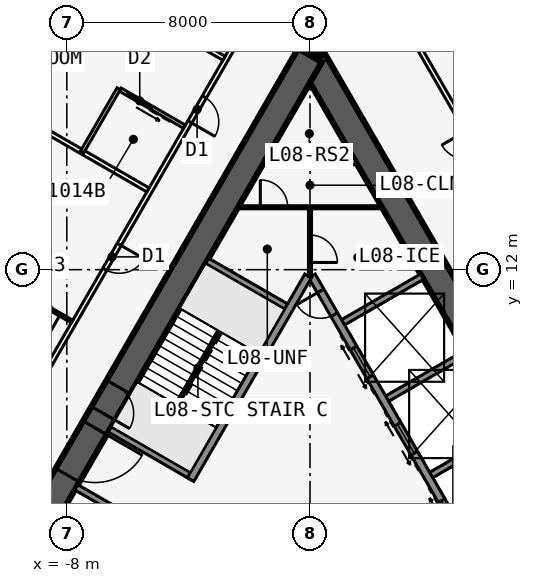
"""IFC4 building model, lengths in metres.
Left out: names, types, materials, properties, quantities, classifications, styles, units other than length and angle.
Written with IfcOpenShell. Run it as: python <this file> out.ifc"""

import sys

from ifc_helpers import new_model, si_unit, direction, frame, frame_2d, origin, place, context, subcontext, project, spatial, rectangle, extrude, element, fill, save


model = new_model("IFC4")
c1 = context("Model", 3, precision=1e-05, world=origin(), true_north=direction((0.0, 1.0)))
c2 = subcontext(c1, "Body", "Model", "MODEL_VIEW")
j1 = project(units=[si_unit("LENGTHUNIT", "METRE"), si_unit("PLANEANGLEUNIT", "RADIAN")], contexts=[c1])
p1 = place(None, origin())
s1 = spatial("IfcSite", under=j1, at=p1, CompositionType="ELEMENT")
p2 = place(p1, origin())
s2 = spatial("IfcBuilding", under=s1, at=p2, CompositionType="ELEMENT")
p3 = place(p2, frame((0.0, 0.0, 38.7)))
s3 = spatial("IfcBuildingStorey", under=s2, at=p3, CompositionType="ELEMENT", Elevation=38.7)
p4 = place(p3, frame((16.5, -9.526, 0.0), z_axis=(0.0, 0.0, 1.0), x_axis=(-0.499999749417, 0.866025548458, 0.0)))
e1 = element("IfcWall", 1, at=p4, inside=s3, PredefinedType="SHEAR", context=c2, shape_type="SweptSolid", body=[
    extrude(rectangle(XDim=33.0, YDim=0.9, at=frame_2d((16.5, 0.0))), origin(), (0.0, 0.0, 1.0), 3.4),
])
p5 = place(p4, frame((14.15, 0.0, 0.0)))
e2 = element("IfcOpeningElement", 2, at=p5, cuts=e1, PredefinedType="OPENING", context=c2, shape_type="SweptSolid", body=[
    extrude(rectangle(XDim=1.8, YDim=2.13, at=frame_2d((0.9, 1.065))), frame((0.0, 0.46, 0.0), z_axis=(0.0, -1.0, 0.0), x_axis=(1.0, 0.0, 0.0)), (0.0, 0.0, 1.0), 0.92),
])
p6 = place(p4, frame((12.6, 0.0, 0.0)))
e3 = element("IfcOpeningElement", 3, at=p6, cuts=e1, PredefinedType="OPENING", context=c2, shape_type="SweptSolid", body=[
    extrude(rectangle(XDim=1.0, YDim=2.13, at=frame_2d((0.5, 1.065))), frame((0.0, 0.46, 0.0), z_axis=(0.0, -1.0, 0.0), x_axis=(1.0, 0.0, 0.0)), (0.0, 0.0, 1.0), 0.92),
])
p7 = place(p3, frame((5.379, 2.586, 0.0), z_axis=(0.0, 0.0, 1.0), x_axis=(-0.500001375892, 0.866024609411, 0.0)))
e4 = element("IfcWall", 4, at=p7, inside=s3, PredefinedType="SOLIDWALL", context=c2, shape_type="SweptSolid", body=[
    extrude(rectangle(XDim=10.633, YDim=0.25, at=frame_2d((5.316, 0.0))), origin(), (0.0, 0.0, 1.0), 3.235),
])
p8 = place(p7, frame((9.164, 0.0, 0.0)))
e5 = element("IfcOpeningElement", 5, at=p8, cuts=e4, PredefinedType="OPENING", context=c2, shape_type="SweptSolid", body=[
    extrude(rectangle(XDim=0.9, YDim=2.13, at=frame_2d((0.45, 1.065))), frame((0.0, 0.135, 0.0), z_axis=(0.0, -1.0, 0.0), x_axis=(1.0, 0.0, 0.0)), (0.0, 0.0, 1.0), 0.27),
])
p9 = place(p7, frame((1.0, 0.0, 0.0)))
e6 = element("IfcOpeningElement", 6, at=p9, cuts=e4, PredefinedType="OPENING", context=c2, shape_type="SweptSolid", body=[
    extrude(rectangle(XDim=1.1, YDim=2.13, at=frame_2d((0.55, 1.065))), frame((0.0, 0.135, 0.0), z_axis=(0.0, -1.0, 0.0), x_axis=(1.0, 0.0, 0.0)), (0.0, 0.0, 1.0), 0.27),
])
p10 = place(p7, frame((3.9, 0.0, 0.0)))
e7 = element("IfcOpeningElement", 7, at=p10, cuts=e4, PredefinedType="OPENING", context=c2, shape_type="SweptSolid", body=[
    extrude(rectangle(XDim=1.1, YDim=2.13, at=frame_2d((0.55, 1.065))), frame((0.0, 0.135, 0.0), z_axis=(0.0, -1.0, 0.0), x_axis=(1.0, 0.0, 0.0)), (0.0, 0.0, 1.0), 0.27),
])
p11 = place(p7, frame((6.8, 0.0, 0.0)))
e8 = element("IfcOpeningElement", 8, at=p11, cuts=e4, PredefinedType="OPENING", context=c2, shape_type="SweptSolid", body=[
    extrude(rectangle(XDim=1.1, YDim=2.13, at=frame_2d((0.55, 1.065))), frame((0.0, 0.135, 0.0), z_axis=(0.0, -1.0, 0.0), x_axis=(1.0, 0.0, 0.0)), (0.0, 0.0, 1.0), 0.27),
])
for number, where, z_axis, x_axis in (
    (9, (3.879, 5.184, 0.0), (0.0, 0.0, 1.0), (0.866, 0.5, 0.0)),
    (10, (2.429, 7.696, 0.0), (0.0, 0.0, 1.0), (0.866, 0.5, 0.0)),
    (11, (0.979, 10.207, 0.0), (0.0, 0.0, 1.0), (0.866, 0.5, 0.0)),
):
    element("IfcWall", number, at=place(p3, frame(where, z_axis=z_axis, x_axis=x_axis)), inside=s3, PredefinedType="SOLIDWALL", context=c2, shape_type="SweptSolid", body=[
        extrude(rectangle(XDim=3.125, YDim=0.2, at=frame_2d((1.562, 0.0))), origin(), (0.0, 0.0, 1.0), 3.235),
    ])
p12 = place(p3, frame((0.0, 19.052, 0.0), z_axis=(0.0, 0.0, 1.0), x_axis=(-0.499999749417, -0.866025548458, 0.0)))
e12 = element("IfcWall", 12, at=p12, inside=s3, PredefinedType="SHEAR", context=c2, shape_type="SweptSolid", body=[
    extrude(rectangle(XDim=33.0, YDim=0.9, at=frame_2d((16.5, 0.0))), origin(), (0.0, 0.0, 1.0), 3.4),
])
p13 = place(p12, frame((14.15, 0.0, 0.0)))
e13 = element("IfcOpeningElement", 13, at=p13, cuts=e12, PredefinedType="OPENING", context=c2, shape_type="SweptSolid", body=[
    extrude(rectangle(XDim=1.8, YDim=2.13, at=frame_2d((0.9, 1.065))), frame((0.0, 0.46, 0.0), z_axis=(0.0, -1.0, 0.0), x_axis=(1.0, 0.0, 0.0)), (0.0, 0.0, 1.0), 0.92),
])
p14 = place(p12, frame((12.6, 0.0, 0.0)))
e14 = element("IfcOpeningElement", 14, at=p14, cuts=e12, PredefinedType="OPENING", context=c2, shape_type="SweptSolid", body=[
    extrude(rectangle(XDim=1.0, YDim=2.13, at=frame_2d((0.5, 1.065))), frame((0.0, 0.46, 0.0), z_axis=(0.0, -1.0, 0.0), x_axis=(1.0, 0.0, 0.0)), (0.0, 0.0, 1.0), 0.92),
])
p15 = place(p3, frame((-0.062, 11.794, 0.0), z_axis=(0.0, 0.0, 1.0), x_axis=(-0.500006680225, -0.86602154692, 0.0)))
e15 = element("IfcWall", 15, at=p15, inside=s3, PredefinedType="SOLIDWALL", context=c2, shape_type="SweptSolid", body=[
    extrude(rectangle(XDim=7.733, YDim=0.25, at=frame_2d((3.866, 0.0))), origin(), (0.0, 0.0, 1.0), 3.235),
])
for number, where, z_axis, x_axis in (
    (16, (-0.679, 10.727, 0.0), (0.0, 0.0, 1.0), (-0.866, 0.5, 0.0)),
    (17, (-3.879, 5.184, 0.0), (0.0, 0.0, 1.0), (-0.866, 0.5, 0.0)),
    (18, (-4.979, 3.279, 0.0), (0.0, 0.0, 1.0), (-0.866, 0.5, 0.0)),
):
    element("IfcWall", number, at=place(p3, frame(where, z_axis=z_axis, x_axis=x_axis)), inside=s3, PredefinedType="SOLIDWALL", context=c2, shape_type="SweptSolid", body=[
        extrude(rectangle(XDim=3.125, YDim=0.2, at=frame_2d((1.562, 0.0))), origin(), (0.0, 0.0, 1.0), 3.235),
    ])
p16 = place(p3, frame((0.0, 19.052, 0.0), z_axis=(0.0, 0.0, 1.0), x_axis=(0.0, 1.0, 0.0)))
e19 = element("IfcWall", 19, at=p16, inside=s3, PredefinedType="SHEAR", context=c2, shape_type="SweptSolid", body=[
    extrude(rectangle(XDim=4.746, YDim=0.9, at=frame_2d((2.373, 0.0))), origin(), (0.0, 0.0, 1.0), 3.4),
])
p17 = place(p16, frame((1.8, 0.0, 0.0)))
e20 = element("IfcOpeningElement", 20, at=p17, cuts=e19, PredefinedType="OPENING", context=c2, shape_type="SweptSolid", body=[
    extrude(rectangle(XDim=1.8, YDim=2.13, at=frame_2d((0.9, 1.065))), frame((0.0, 0.46, 0.0), z_axis=(0.0, -1.0, 0.0), x_axis=(1.0, 0.0, 0.0)), (0.0, 0.0, 1.0), 0.92),
])
p18 = place(p3, frame((21.586, -11.885, 0.0), z_axis=(0.0, 0.0, 1.0), x_axis=(-0.500001915564, 0.86602429783, 0.0)))
e21 = element("IfcWall", 21, at=p18, inside=s3, PredefinedType="PARTITIONING", context=c2, shape_type="SweptSolid", body=[
    extrude(rectangle(XDim=42.172, YDim=0.15, at=frame_2d((21.086, 0.0))), origin(), (0.0, 0.0, 1.0), 3.235),
])
p19 = place(p18, frame((1.911, 0.0, 0.0)))
e22 = element("IfcOpeningElement", 22, at=p19, cuts=e21, PredefinedType="OPENING", context=c2, shape_type="SweptSolid", body=[
    extrude(rectangle(XDim=0.95, YDim=2.13, at=frame_2d((0.475, 1.065))), frame((0.0, 0.085, 0.0), z_axis=(0.0, -1.0, 0.0), x_axis=(1.0, 0.0, 0.0)), (0.0, 0.0, 1.0), 0.17),
])
p20 = place(p18, frame((7.511, 0.0, 0.0)))
e23 = element("IfcOpeningElement", 23, at=p20, cuts=e21, PredefinedType="OPENING", context=c2, shape_type="SweptSolid", body=[
    extrude(rectangle(XDim=0.95, YDim=2.13, at=frame_2d((0.475, 1.065))), frame((0.0, 0.085, 0.0), z_axis=(0.0, -1.0, 0.0), x_axis=(1.0, 0.0, 0.0)), (0.0, 0.0, 1.0), 0.17),
])
p21 = place(p18, frame((13.711, 0.0, 0.0)))
e24 = element("IfcOpeningElement", 24, at=p21, cuts=e21, PredefinedType="OPENING", context=c2, shape_type="SweptSolid", body=[
    extrude(rectangle(XDim=0.95, YDim=2.13, at=frame_2d((0.475, 1.065))), frame((0.0, 0.085, 0.0), z_axis=(0.0, -1.0, 0.0), x_axis=(1.0, 0.0, 0.0)), (0.0, 0.0, 1.0), 0.17),
])
p22 = place(p18, frame((21.911, 0.0, 0.0)))
e25 = element("IfcOpeningElement", 25, at=p22, cuts=e21, PredefinedType="OPENING", context=c2, shape_type="SweptSolid", body=[
    extrude(rectangle(XDim=0.95, YDim=2.13, at=frame_2d((0.475, 1.065))), frame((0.0, 0.085, 0.0), z_axis=(0.0, -1.0, 0.0), x_axis=(1.0, 0.0, 0.0)), (0.0, 0.0, 1.0), 0.17),
])
p23 = place(p18, frame((28.711, 0.0, 0.0)))
e26 = element("IfcOpeningElement", 26, at=p23, cuts=e21, PredefinedType="OPENING", context=c2, shape_type="SweptSolid", body=[
    extrude(rectangle(XDim=0.95, YDim=2.13, at=frame_2d((0.475, 1.065))), frame((0.0, 0.085, 0.0), z_axis=(0.0, -1.0, 0.0), x_axis=(1.0, 0.0, 0.0)), (0.0, 0.0, 1.0), 0.17),
])
p24 = place(p18, frame((31.911, 0.0, 0.0)))
e27 = element("IfcOpeningElement", 27, at=p24, cuts=e21, PredefinedType="OPENING", context=c2, shape_type="SweptSolid", body=[
    extrude(rectangle(XDim=0.95, YDim=2.13, at=frame_2d((0.475, 1.065))), frame((0.0, 0.085, 0.0), z_axis=(0.0, -1.0, 0.0), x_axis=(1.0, 0.0, 0.0)), (0.0, 0.0, 1.0), 0.17),
])
p25 = place(p18, frame((39.311, 0.0, 0.0)))
e28 = element("IfcOpeningElement", 28, at=p25, cuts=e21, PredefinedType="OPENING", context=c2, shape_type="SweptSolid", body=[
    extrude(rectangle(XDim=0.95, YDim=2.13, at=frame_2d((0.475, 1.065))), frame((0.0, 0.085, 0.0), z_axis=(0.0, -1.0, 0.0), x_axis=(1.0, 0.0, 0.0)), (0.0, 0.0, 1.0), 0.17),
])
p26 = place(p3, frame((-0.5, 22.836, 0.0), z_axis=(0.0, 0.0, 1.0), x_axis=(-0.500001677587, -0.866024435227, 0.0)))
e29 = element("IfcWall", 29, at=p26, inside=s3, PredefinedType="PARTITIONING", context=c2, shape_type="SweptSolid", body=[
    extrude(rectangle(XDim=39.054, YDim=0.15, at=frame_2d((19.527, 0.0))), origin(), (0.0, 0.0, 1.0), 3.235),
])
p27 = place(p26, frame((0.352, 0.0, 0.0)))
e30 = element("IfcOpeningElement", 30, at=p27, cuts=e29, PredefinedType="OPENING", context=c2, shape_type="SweptSolid", body=[
    extrude(rectangle(XDim=0.95, YDim=2.13, at=frame_2d((0.475, 1.065))), frame((0.0, 0.085, 0.0), z_axis=(0.0, -1.0, 0.0), x_axis=(1.0, 0.0, 0.0)), (0.0, 0.0, 1.0), 0.17),
])
p28 = place(p26, frame((5.952, 0.0, 0.0)))
e31 = element("IfcOpeningElement", 31, at=p28, cuts=e29, PredefinedType="OPENING", context=c2, shape_type="SweptSolid", body=[
    extrude(rectangle(XDim=0.95, YDim=2.13, at=frame_2d((0.475, 1.065))), frame((0.0, 0.085, 0.0), z_axis=(0.0, -1.0, 0.0), x_axis=(1.0, 0.0, 0.0)), (0.0, 0.0, 1.0), 0.17),
])
p29 = place(p26, frame((11.552, 0.0, 0.0)))
e32 = element("IfcOpeningElement", 32, at=p29, cuts=e29, PredefinedType="OPENING", context=c2, shape_type="SweptSolid", body=[
    extrude(rectangle(XDim=0.95, YDim=2.13, at=frame_2d((0.475, 1.065))), frame((0.0, 0.085, 0.0), z_axis=(0.0, -1.0, 0.0), x_axis=(1.0, 0.0, 0.0)), (0.0, 0.0, 1.0), 0.17),
])
p30 = place(p26, frame((21.552, 0.0, 0.0)))
e33 = element("IfcOpeningElement", 33, at=p30, cuts=e29, PredefinedType="OPENING", context=c2, shape_type="SweptSolid", body=[
    extrude(rectangle(XDim=0.95, YDim=2.13, at=frame_2d((0.475, 1.065))), frame((0.0, 0.085, 0.0), z_axis=(0.0, -1.0, 0.0), x_axis=(1.0, 0.0, 0.0)), (0.0, 0.0, 1.0), 0.17),
])
p31 = place(p26, frame((30.952, 0.0, 0.0)))
e34 = element("IfcOpeningElement", 34, at=p31, cuts=e29, PredefinedType="OPENING", context=c2, shape_type="SweptSolid", body=[
    extrude(rectangle(XDim=0.95, YDim=2.13, at=frame_2d((0.475, 1.065))), frame((0.0, 0.085, 0.0), z_axis=(0.0, -1.0, 0.0), x_axis=(1.0, 0.0, 0.0)), (0.0, 0.0, 1.0), 0.17),
])
p32 = place(p26, frame((37.752, 0.0, 0.0)))
e35 = element("IfcOpeningElement", 35, at=p32, cuts=e29, PredefinedType="OPENING", context=c2, shape_type="SweptSolid", body=[
    extrude(rectangle(XDim=0.95, YDim=2.13, at=frame_2d((0.475, 1.065))), frame((0.0, 0.085, 0.0), z_axis=(0.0, -1.0, 0.0), x_axis=(1.0, 0.0, 0.0)), (0.0, 0.0, 1.0), 0.17),
])
p33 = place(p3, frame((-2.829, 18.954, 0.0), z_axis=(0.0, 0.0, 1.0), x_axis=(-0.866020536561, 0.500008430184, 0.0)))
e36 = element("IfcWall", 36, at=p33, inside=s3, PredefinedType="PARTITIONING", context=c2, shape_type="SweptSolid", body=[
    extrude(rectangle(XDim=8.72, YDim=0.15, at=frame_2d((4.36, 0.0))), origin(), (0.0, 0.0, 1.0), 2.389),
])
p34 = place(p3, frame((-5.329, 14.623, 0.0), z_axis=(0.0, 0.0, 1.0), x_axis=(-0.866018409083, 0.500012114982, 0.0)))
e37 = element("IfcWall", 37, at=p34, inside=s3, PredefinedType="PARTITIONING", context=c2, shape_type="SweptSolid", body=[
    extrude(rectangle(XDim=9.485, YDim=0.15, at=frame_2d((4.742, 0.0))), origin(), (0.0, 0.0, 1.0), 2.389),
])
p35 = place(p3, frame((-7.829, 10.293, 0.0), z_axis=(0.0, 0.0, 1.0), x_axis=(-0.866016302457, 0.50001576363, 0.0)))
e38 = element("IfcWall", 38, at=p35, inside=s3, PredefinedType="PARTITIONING", context=c2, shape_type="SweptSolid", body=[
    extrude(rectangle(XDim=9.943, YDim=0.1, at=frame_2d((4.972, 0.0))), origin(), (0.0, 0.0, 1.0), 2.389),
])
p36 = place(p35, frame((0.45, 0.0, 0.0)))
e39 = element("IfcOpeningElement", 39, at=p36, cuts=e38, PredefinedType="OPENING", context=c2, shape_type="SweptSolid", body=[
    extrude(rectangle(XDim=0.9, YDim=2.13, at=frame_2d((0.45, 1.065))), frame((0.0, 0.06, 0.0), z_axis=(0.0, -1.0, 0.0), x_axis=(1.0, 0.0, 0.0)), (0.0, 0.0, 1.0), 0.12),
])
p37 = place(p3, frame((-6.293, 17.952, 0.0), z_axis=(0.0, 0.0, 1.0), x_axis=(-0.499957262057, -0.866050077142, 0.0)))
e40 = element("IfcWall", 40, at=p37, inside=s3, PredefinedType="PLUMBINGWALL", context=c2, shape_type="SweptSolid", body=[
    extrude(rectangle(XDim=2.4, YDim=0.12, at=frame_2d((1.2, 0.0))), origin(), (0.0, 0.0, 1.0), 3.235),
])
p38 = place(p3, frame((-4.128, 16.702, 0.0), z_axis=(0.0, 0.0, 1.0), x_axis=(-0.866048967903, 0.499959183527, 0.0)))
e41 = element("IfcWall", 41, at=p38, inside=s3, PredefinedType="PLUMBINGWALL", context=c2, shape_type="SweptSolid", body=[
    extrude(rectangle(XDim=2.44, YDim=0.12, at=frame_2d((1.22, 0.0))), origin(), (0.0, 0.0, 1.0), 3.235),
])
p39 = place(p38, frame((1.25, 0.0, 0.0)))
e42 = element("IfcOpeningElement", 42, at=p39, cuts=e41, PredefinedType="OPENING", context=c2, shape_type="SweptSolid", body=[
    extrude(rectangle(XDim=0.9, YDim=2.13, at=frame_2d((0.45, 1.065))), frame((0.0, 0.07, 0.0), z_axis=(0.0, -1.0, 0.0), x_axis=(1.0, 0.0, 0.0)), (0.0, 0.0, 1.0), 0.14),
])
p40 = place(p3, frame((-1.501, 15.552, 0.0), z_axis=(0.0, 0.0, 1.0), x_axis=(1.0, 0.0, 0.0)))
e43 = element("IfcWall", 43, at=p40, inside=s3, PredefinedType="SOLIDWALL", context=c2, shape_type="SweptSolid", body=[
    extrude(rectangle(XDim=3.002, YDim=0.2, at=frame_2d((1.501, 0.0))), origin(), (0.0, 0.0, 1.0), 3.235),
])
p41 = place(p3, frame((-2.367, 14.052, 0.0), z_axis=(0.0, 0.0, 1.0), x_axis=(1.0, 0.0, 0.0)))
e44 = element("IfcWall", 44, at=p41, inside=s3, PredefinedType="PARTITIONING", context=c2, shape_type="SweptSolid", body=[
    extrude(rectangle(XDim=4.734, YDim=0.1, at=frame_2d((2.367, 0.0))), origin(), (0.0, 0.0, 1.0), 3.235),
])
p42 = place(p41, frame((0.734, 0.0, 0.0)))
e45 = element("IfcOpeningElement", 45, at=p42, cuts=e44, PredefinedType="OPENING", context=c2, shape_type="SweptSolid", body=[
    extrude(rectangle(XDim=0.9, YDim=2.13, at=frame_2d((0.45, 1.065))), frame((0.0, 0.06, 0.0), z_axis=(0.0, -1.0, 0.0), x_axis=(1.0, 0.0, 0.0)), (0.0, 0.0, 1.0), 0.12),
])
p43 = place(p3, frame((0.0, 14.052, 0.0), z_axis=(0.0, 0.0, 1.0), x_axis=(0.0, -1.0, 0.0)))
e46 = element("IfcWall", 46, at=p43, inside=s3, PredefinedType="PARTITIONING", context=c2, shape_type="SweptSolid", body=[
    extrude(rectangle(XDim=2.275, YDim=0.1, at=frame_2d((1.138, 0.0))), origin(), (0.0, 0.0, 1.0), 3.235),
])
p44 = place(p43, frame((0.915, 0.0, 0.0)))
e47 = element("IfcOpeningElement", 47, at=p44, cuts=e46, PredefinedType="OPENING", context=c2, shape_type="SweptSolid", body=[
    extrude(rectangle(XDim=0.9, YDim=2.13, at=frame_2d((0.45, 1.065))), frame((0.0, 0.06, 0.0), z_axis=(0.0, -1.0, 0.0), x_axis=(1.0, 0.0, 0.0)), (0.0, 0.0, 1.0), 0.12),
])
p45 = place(p3, frame((-2.988, 9.978, 0.0), z_axis=(0.0, 0.0, 1.0), x_axis=(-0.499992232847, -0.866029888106, 0.0)))
e48 = element("IfcWall", 48, at=p45, inside=s3, PredefinedType="SOLIDWALL", context=c2, shape_type="SweptSolid", body=[
    extrude(rectangle(XDim=2.794, YDim=0.1, at=frame_2d((1.397, 0.0))), origin(), (0.0, 0.0, 1.0), 3.4),
])
p46 = place(p36, origin())
e49 = element("IfcDoor", 49, at=p46, inside=s3, OperationType="SINGLE_SWING_LEFT", PredefinedType="DOOR", context=c2, shape_type="SweptSolid", body=[
    extrude(rectangle(XDim=0.9, YDim=2.13, at=frame_2d((0.45, 1.065))), frame((0.0, 0.025, 0.0), z_axis=(0.0, -1.0, 0.0), x_axis=(1.0, 0.0, 0.0)), (0.0, 0.0, 1.0), 0.05),
])
fill(e39, e49)
p47 = place(p39, origin())
e50 = element("IfcDoor", 50, at=p47, inside=s3, OperationType="SLIDING_TO_LEFT", PredefinedType="DOOR", context=c2, shape_type="SweptSolid", body=[
    extrude(rectangle(XDim=0.9, YDim=2.13, at=frame_2d((0.45, 1.065))), frame((0.0, 0.025, 0.0), z_axis=(0.0, -1.0, 0.0), x_axis=(1.0, 0.0, 0.0)), (0.0, 0.0, 1.0), 0.05),
])
fill(e42, e50)
p48 = place(p28, origin())
e51 = element("IfcDoor", 51, at=p48, inside=s3, OperationType="SINGLE_SWING_RIGHT", PredefinedType="DOOR", context=c2, shape_type="SweptSolid", body=[
    extrude(rectangle(XDim=0.95, YDim=2.13, at=frame_2d((0.475, 1.065))), frame((0.0, 0.025, 0.0), z_axis=(0.0, -1.0, 0.0), x_axis=(1.0, 0.0, 0.0)), (0.0, 0.0, 1.0), 0.05),
])
fill(e31, e51)
p49 = place(p29, origin())
e52 = element("IfcDoor", 52, at=p49, inside=s3, OperationType="SINGLE_SWING_LEFT", PredefinedType="DOOR", context=c2, shape_type="SweptSolid", body=[
    extrude(rectangle(XDim=0.95, YDim=2.13, at=frame_2d((0.475, 1.065))), frame((0.0, 0.025, 0.0), z_axis=(0.0, -1.0, 0.0), x_axis=(1.0, 0.0, 0.0)), (0.0, 0.0, 1.0), 0.05),
])
fill(e32, e52)
p50 = place(p13, origin())
e53 = element("IfcDoor", 53, at=p50, inside=s3, OperationType="DOUBLE_DOOR_SINGLE_SWING", PredefinedType="DOOR", context=c2, shape_type="SweptSolid", body=[
    extrude(rectangle(XDim=1.8, YDim=2.13, at=frame_2d((0.9, 1.065))), frame((0.0, 0.025, 0.0), z_axis=(0.0, -1.0, 0.0), x_axis=(1.0, 0.0, 0.0)), (0.0, 0.0, 1.0), 0.05),
])
fill(e13, e53)
p51 = place(p14, origin())
e54 = element("IfcDoor", 54, at=p51, inside=s3, OperationType="SINGLE_SWING_RIGHT", PredefinedType="DOOR", context=c2, shape_type="SweptSolid", body=[
    extrude(rectangle(XDim=1.0, YDim=2.13, at=frame_2d((0.5, 1.065))), frame((0.0, 0.025, 0.0), z_axis=(0.0, -1.0, 0.0), x_axis=(1.0, 0.0, 0.0)), (0.0, 0.0, 1.0), 0.05),
])
fill(e14, e54)
p52 = place(p42, origin())
e55 = element("IfcDoor", 55, at=p52, inside=s3, OperationType="SINGLE_SWING_LEFT", PredefinedType="DOOR", context=c2, shape_type="SweptSolid", body=[
    extrude(rectangle(XDim=0.9, YDim=2.13, at=frame_2d((0.45, 1.065))), frame((0.0, 0.025, 0.0), z_axis=(0.0, -1.0, 0.0), x_axis=(1.0, 0.0, 0.0)), (0.0, 0.0, 1.0), 0.05),
])
fill(e45, e55)
p53 = place(p8, origin())
e56 = element("IfcDoor", 56, at=p53, inside=s3, OperationType="SINGLE_SWING_RIGHT", PredefinedType="DOOR", context=c2, shape_type="SweptSolid", body=[
    extrude(rectangle(XDim=0.9, YDim=2.13, at=frame_2d((0.45, 1.065))), frame((0.0, 0.025, 0.0), z_axis=(0.0, -1.0, 0.0), x_axis=(1.0, 0.0, 0.0)), (0.0, 0.0, 1.0), 0.05),
])
fill(e5, e56)
p54 = place(p44, origin())
e57 = element("IfcDoor", 57, at=p54, inside=s3, OperationType="SINGLE_SWING_RIGHT", PredefinedType="DOOR", context=c2, shape_type="SweptSolid", body=[
    extrude(rectangle(XDim=0.9, YDim=2.13, at=frame_2d((0.45, 1.065))), frame((0.0, 0.025, 0.0), z_axis=(0.0, -1.0, 0.0), x_axis=(1.0, 0.0, 0.0)), (0.0, 0.0, 1.0), 0.05),
])
fill(e47, e57)
p55 = place(p9, origin())
e58 = element("IfcDoor", 58, at=p55, inside=s3, OperationType="DOUBLE_DOOR_SLIDING", PredefinedType="USERDEFINED", context=c2, shape_type="SweptSolid", body=[
    extrude(rectangle(XDim=1.1, YDim=2.13, at=frame_2d((0.55, 1.065))), frame((0.0, 0.025, 0.0), z_axis=(0.0, -1.0, 0.0), x_axis=(1.0, 0.0, 0.0)), (0.0, 0.0, 1.0), 0.05),
])
fill(e6, e58)
p56 = place(p10, origin())
e59 = element("IfcDoor", 59, at=p56, inside=s3, OperationType="DOUBLE_DOOR_SLIDING", PredefinedType="USERDEFINED", context=c2, shape_type="SweptSolid", body=[
    extrude(rectangle(XDim=1.1, YDim=2.13, at=frame_2d((0.55, 1.065))), frame((0.0, 0.025, 0.0), z_axis=(0.0, -1.0, 0.0), x_axis=(1.0, 0.0, 0.0)), (0.0, 0.0, 1.0), 0.05),
])
fill(e7, e59)
p57 = place(p11, origin())
e60 = element("IfcDoor", 60, at=p57, inside=s3, OperationType="DOUBLE_DOOR_SLIDING", PredefinedType="USERDEFINED", context=c2, shape_type="SweptSolid", body=[
    extrude(rectangle(XDim=1.1, YDim=2.13, at=frame_2d((0.55, 1.065))), frame((0.0, 0.025, 0.0), z_axis=(0.0, -1.0, 0.0), x_axis=(1.0, 0.0, 0.0)), (0.0, 0.0, 1.0), 0.05),
])
fill(e8, e60)
save(model, sys.argv[1])
